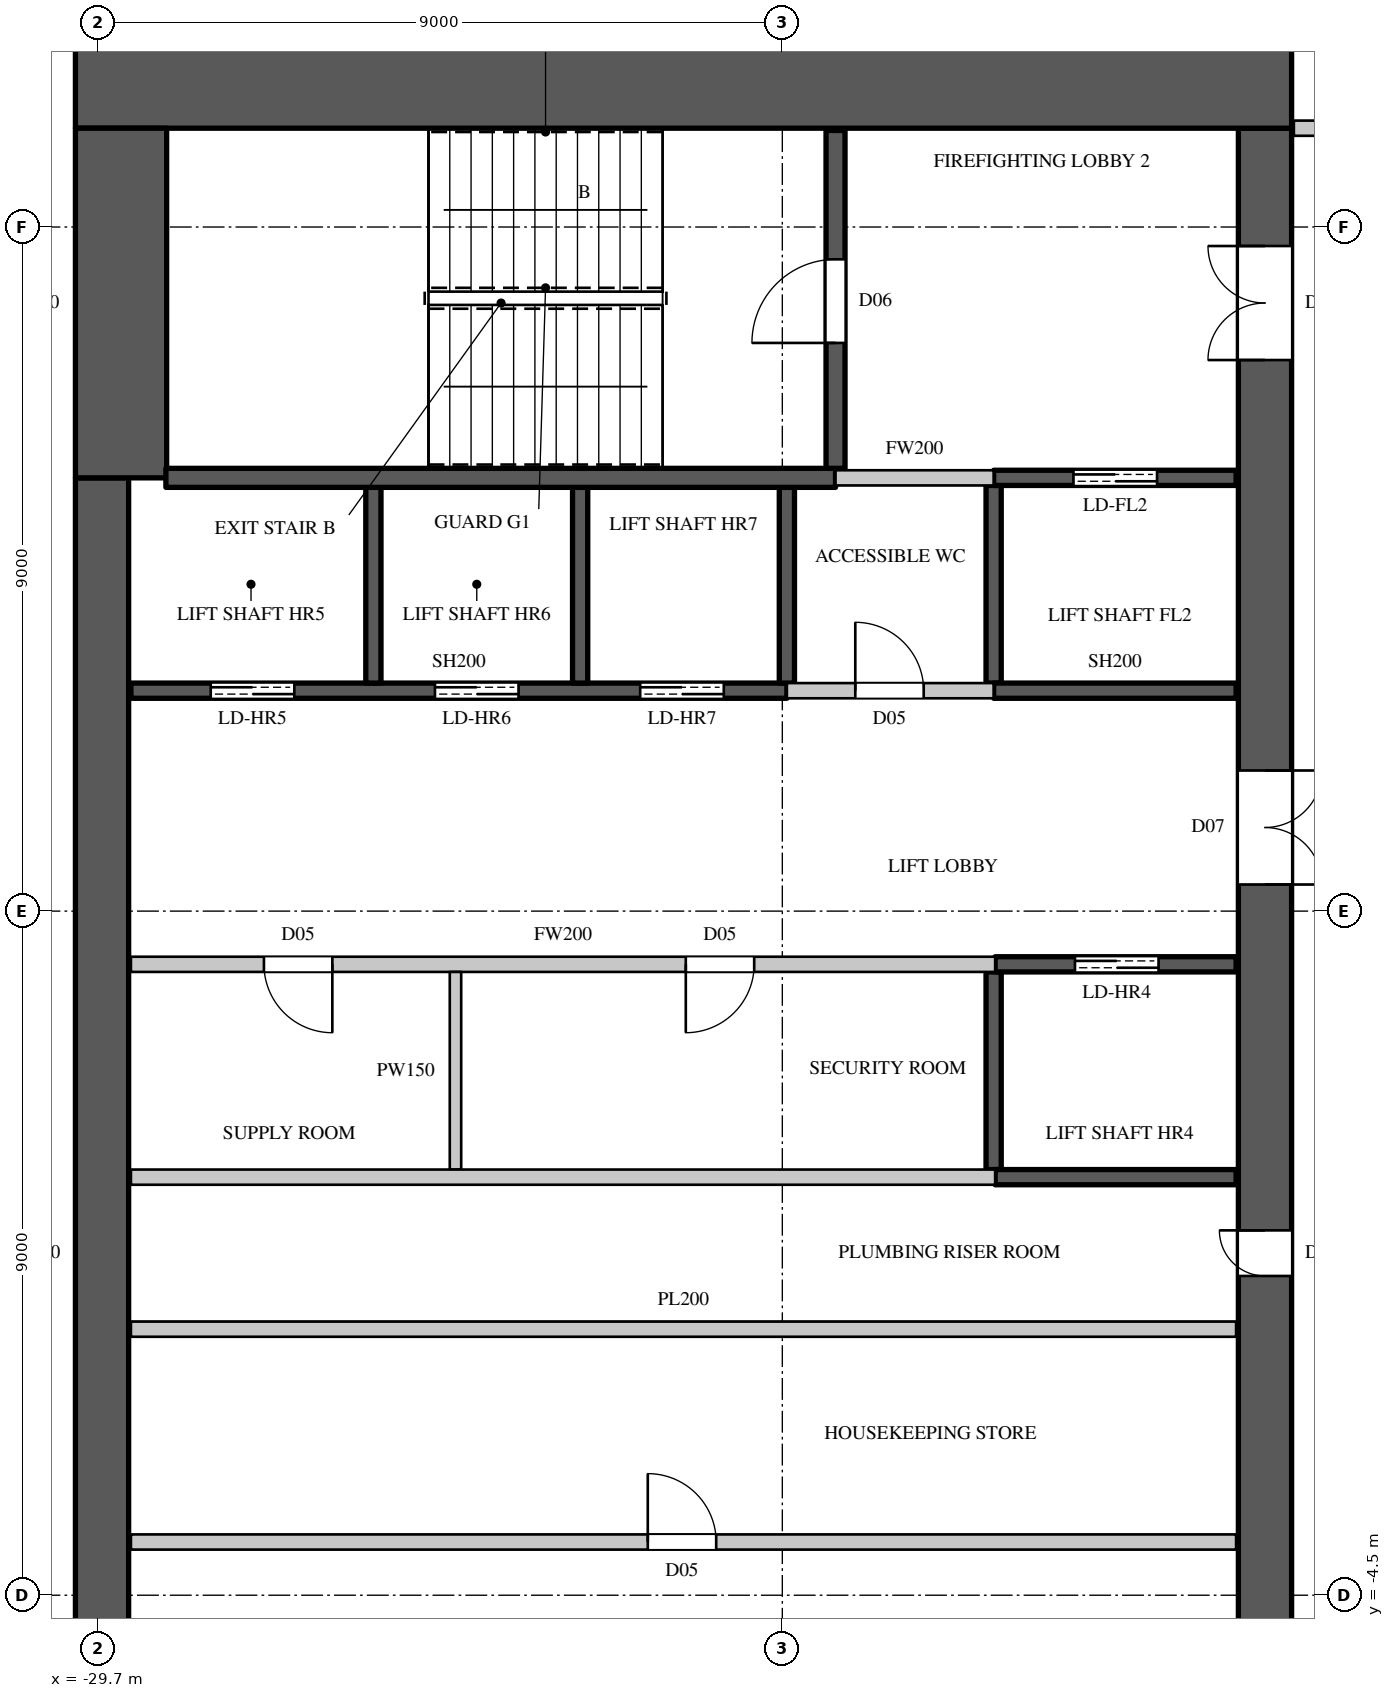
"""IFC4 building model, lengths in metres.
Left out: names, types, materials, properties, quantities, classifications, styles, units other than length and angle.
Written with IfcOpenShell. Run it as: python <this file> out.ifc"""

import sys

from ifc_helpers import new_model, si_unit, direction, frame, frame_2d, origin, place, context, subcontext, project, spatial, rectangle, extrude, element, fill, save


model = new_model("IFC4")
c1 = context("Model", 3, precision=1e-05, world=origin(), true_north=direction((0.0, 1.0)))
c2 = subcontext(c1, "Body", "Model", "MODEL_VIEW")
j1 = project(units=[si_unit("LENGTHUNIT", "METRE"), si_unit("PLANEANGLEUNIT", "RADIAN")], contexts=[c1])
p1 = place(None, origin())
s1 = spatial("IfcSite", under=j1, at=p1, CompositionType="ELEMENT")
p2 = place(p1, origin())
s2 = spatial("IfcBuilding", under=s1, at=p2, CompositionType="ELEMENT")
p3 = place(p2, frame((0.0, 0.0, 255.7)))
s3 = spatial("IfcBuildingStorey", under=s2, at=p3, CompositionType="ELEMENT", Elevation=255.7)
p4 = place(p3, frame((-30.0, 15.4, 0.0), z_axis=(0.0, 0.0, 1.0), x_axis=(1.0, 0.0, 0.0)))
e1 = element("IfcWall", 1, at=p4, inside=s3, PredefinedType="SHEAR", context=c2, shape_type="SweptSolid", body=[
    extrude(rectangle(XDim=16.0, YDim=1.2, at=frame_2d((8.0, 0.0))), origin(), (0.0, 0.0, 1.0), 4.1),
])
p5 = place(p3, frame((-14.35, -14.8, 0.0), z_axis=(0.0, 0.0, 1.0), x_axis=(0.0, 1.0, 0.0)))
e2 = element("IfcWall", 2, at=p5, inside=s3, PredefinedType="SHEAR", context=c2, shape_type="SweptSolid", body=[
    extrude(rectangle(XDim=29.6, YDim=0.7, at=frame_2d((14.8, 0.0))), origin(), (0.0, 0.0, 1.0), 4.1),
])
p6 = place(p5, frame((1.55, 0.0, 0.0)))
e3 = element("IfcOpeningElement", 3, at=p6, cuts=e2, PredefinedType="OPENING", context=c2, shape_type="SweptSolid", body=[
    extrude(rectangle(XDim=1.5, YDim=2.4, at=frame_2d((0.75, 1.2))), frame((0.0, 0.36, 0.0), z_axis=(0.0, -1.0, 0.0), x_axis=(1.0, 0.0, 0.0)), (0.0, 0.0, 1.0), 0.72),
])
p7 = place(p5, frame((26.55, 0.0, 0.0)))
e4 = element("IfcOpeningElement", 4, at=p7, cuts=e2, PredefinedType="OPENING", context=c2, shape_type="SweptSolid", body=[
    extrude(rectangle(XDim=1.5, YDim=2.4, at=frame_2d((0.75, 1.2))), frame((0.0, 0.36, 0.0), z_axis=(0.0, -1.0, 0.0), x_axis=(1.0, 0.0, 0.0)), (0.0, 0.0, 1.0), 0.72),
])
p8 = place(p5, frame((8.45, 0.0, 0.0)))
e5 = element("IfcOpeningElement", 5, at=p8, cuts=e2, PredefinedType="OPENING", context=c2, shape_type="SweptSolid", body=[
    extrude(rectangle(XDim=1.5, YDim=2.4, at=frame_2d((0.75, 1.2))), frame((0.0, 0.36, 0.0), z_axis=(0.0, -1.0, 0.0), x_axis=(1.0, 0.0, 0.0)), (0.0, 0.0, 1.0), 0.72),
])
p9 = place(p5, frame((19.65, 0.0, 0.0)))
e6 = element("IfcOpeningElement", 6, at=p9, cuts=e2, PredefinedType="OPENING", context=c2, shape_type="SweptSolid", body=[
    extrude(rectangle(XDim=1.5, YDim=2.4, at=frame_2d((0.75, 1.2))), frame((0.0, 0.36, 0.0), z_axis=(0.0, -1.0, 0.0), x_axis=(1.0, 0.0, 0.0)), (0.0, 0.0, 1.0), 0.72),
])
p10 = place(p5, frame((14.5, 0.0, 0.0)))
e7 = element("IfcOpeningElement", 7, at=p10, cuts=e2, PredefinedType="OPENING", context=c2, shape_type="SweptSolid", body=[
    extrude(rectangle(XDim=0.6, YDim=2.0, at=frame_2d((0.3, 1.0))), frame((0.0, 0.36, 0.0), z_axis=(0.0, -1.0, 0.0), x_axis=(1.0, 0.0, 0.0)), (0.0, 0.0, 1.0), 0.72),
])
p11 = place(p3, frame((-29.65, -10.2, 0.0), z_axis=(0.0, 0.0, 1.0), x_axis=(0.0, 1.0, 0.0)))
e8 = element("IfcWall", 8, at=p11, inside=s3, PredefinedType="SHEAR", context=c2, shape_type="SweptSolid", body=[
    extrude(rectangle(XDim=20.4, YDim=0.7, at=frame_2d((10.2, 0.0))), origin(), (0.0, 0.0, 1.0), 4.1),
])
p12 = place(p3, frame((-29.4, 10.2, 0.0), z_axis=(0.0, 0.0, 1.0), x_axis=(0.0, 1.0, 0.0)))
e9 = element("IfcWall", 9, at=p12, inside=s3, PredefinedType="SHEAR", context=c2, shape_type="SweptSolid", body=[
    extrude(rectangle(XDim=4.6, YDim=1.2, at=frame_2d((2.3, 0.0))), origin(), (0.0, 0.0, 1.0), 4.1),
])
p13 = place(p3, frame((-29.27, -3.8, 0.0), z_axis=(0.0, 0.0, 1.0), x_axis=(1.0, 0.0, 0.0)))
e10 = element("IfcWall", 10, at=p13, inside=s3, PredefinedType="PARTITIONING", context=c2, shape_type="SweptSolid", body=[
    extrude(rectangle(XDim=14.54, YDim=0.2, at=frame_2d((7.27, 0.0))), origin(), (0.0, 0.0, 1.0), 3.8),
])
p14 = place(p13, frame((6.8, 0.0, 0.0)))
e11 = element("IfcOpeningElement", 11, at=p14, cuts=e10, PredefinedType="OPENING", context=c2, shape_type="SweptSolid", body=[
    extrude(rectangle(XDim=0.9, YDim=2.2, at=frame_2d((0.45, 1.1))), frame((0.0, 0.11, 0.0), z_axis=(0.0, -1.0, 0.0), x_axis=(1.0, 0.0, 0.0)), (0.0, 0.0, 1.0), 0.22),
])
p15 = place(p3, frame((-29.27, 3.8, 0.0), z_axis=(0.0, 0.0, 1.0), x_axis=(1.0, 0.0, 0.0)))
e12 = element("IfcWall", 12, at=p15, inside=s3, PredefinedType="PARTITIONING", context=c2, shape_type="SweptSolid", body=[
    extrude(rectangle(XDim=11.37, YDim=0.2, at=frame_2d((5.685, 0.0))), origin(), (0.0, 0.0, 1.0), 3.8),
])
p16 = place(p15, frame((1.75, 0.0, 0.0)))
e13 = element("IfcOpeningElement", 13, at=p16, cuts=e12, PredefinedType="OPENING", context=c2, shape_type="SweptSolid", body=[
    extrude(rectangle(XDim=0.9, YDim=2.2, at=frame_2d((0.45, 1.1))), frame((0.0, 0.11, 0.0), z_axis=(0.0, -1.0, 0.0), x_axis=(1.0, 0.0, 0.0)), (0.0, 0.0, 1.0), 0.22),
])
p17 = place(p15, frame((7.3, 0.0, 0.0)))
e14 = element("IfcOpeningElement", 14, at=p17, cuts=e12, PredefinedType="OPENING", context=c2, shape_type="SweptSolid", body=[
    extrude(rectangle(XDim=0.9, YDim=2.2, at=frame_2d((0.45, 1.1))), frame((0.0, 0.11, 0.0), z_axis=(0.0, -1.0, 0.0), x_axis=(1.0, 0.0, 0.0)), (0.0, 0.0, 1.0), 0.22),
])
p18 = place(p3, frame((-20.64, 7.4, 0.0), z_axis=(0.0, 0.0, 1.0), x_axis=(1.0, 0.0, 0.0)))
e15 = element("IfcWall", 15, at=p18, inside=s3, PredefinedType="PARTITIONING", context=c2, shape_type="SweptSolid", body=[
    extrude(rectangle(XDim=2.72, YDim=0.2, at=frame_2d((1.36, 0.0))), origin(), (0.0, 0.0, 1.0), 3.8),
])
p19 = place(p18, frame((0.9, 0.0, 0.0)))
e16 = element("IfcOpeningElement", 16, at=p19, cuts=e15, PredefinedType="OPENING", context=c2, shape_type="SweptSolid", body=[
    extrude(rectangle(XDim=0.9, YDim=2.2, at=frame_2d((0.45, 1.1))), frame((0.0, 0.11, 0.0), z_axis=(0.0, -1.0, 0.0), x_axis=(1.0, 0.0, 0.0)), (0.0, 0.0, 1.0), 0.22),
])
p20 = place(p3, frame((-20.0, 10.2, 0.0), z_axis=(0.0, 0.0, 1.0), x_axis=(1.0, 0.0, 0.0)))
e17 = element("IfcWall", 17, at=p20, inside=s3, PredefinedType="PARTITIONING", context=c2, shape_type="SweptSolid", body=[
    extrude(rectangle(XDim=2.08, YDim=0.2, at=frame_2d((1.04, 0.0))), origin(), (0.0, 0.0, 1.0), 3.8),
])
p21 = place(p3, frame((-13.97, 14.8, 0.0), z_axis=(0.0, 0.0, 1.0), x_axis=(1.0, 0.0, 0.0)))
e18 = element("IfcWall", 18, at=p21, inside=s3, PredefinedType="PARTITIONING", context=c2, shape_type="SweptSolid", body=[
    extrude(rectangle(XDim=3.07, YDim=0.2, at=frame_2d((1.535, 0.0))), origin(), (0.0, 0.0, 1.0), 3.8),
])
p22 = place(p3, frame((-25.0, 1.1, 0.0), z_axis=(0.0, 0.0, 1.0), x_axis=(0.0, 1.0, 0.0)))
e19 = element("IfcWall", 19, at=p22, inside=s3, PredefinedType="PARTITIONING", context=c2, shape_type="SweptSolid", body=[
    extrude(rectangle(XDim=2.6, YDim=0.15, at=frame_2d((1.3, 0.0))), origin(), (0.0, 0.0, 1.0), 3.8),
])
p23 = place(p3, frame((-29.27, -1.0, 0.0), z_axis=(0.0, 0.0, 1.0), x_axis=(1.0, 0.0, 0.0)))
e20 = element("IfcWall", 20, at=p23, inside=s3, PredefinedType="PARTITIONING", context=c2, shape_type="SweptSolid", body=[
    extrude(rectangle(XDim=14.54, YDim=0.2, at=frame_2d((7.27, 0.0))), origin(), (0.0, 0.0, 1.0), 3.8),
])
p24 = place(p3, frame((-29.27, 1.0, 0.0), z_axis=(0.0, 0.0, 1.0), x_axis=(1.0, 0.0, 0.0)))
e21 = element("IfcWall", 21, at=p24, inside=s3, PredefinedType="PARTITIONING", context=c2, shape_type="SweptSolid", body=[
    extrude(rectangle(XDim=11.37, YDim=0.2, at=frame_2d((5.685, 0.0))), origin(), (0.0, 0.0, 1.0), 3.8),
])
p25 = place(p3, frame((-29.27, 7.4, 0.0), z_axis=(0.0, 0.0, 1.0), x_axis=(1.0, 0.0, 0.0)))
e22 = element("IfcWall", 22, at=p25, inside=s3, PredefinedType="SHEAR", context=c2, shape_type="SweptSolid", body=[
    extrude(rectangle(XDim=8.63, YDim=0.2, at=frame_2d((4.315, 0.0))), origin(), (0.0, 0.0, 1.0), 3.8),
])
p26 = place(p25, frame((1.05, 0.0, 0.0)))
e23 = element("IfcOpeningElement", 23, at=p26, cuts=e22, PredefinedType="OPENING", context=c2, shape_type="SweptSolid", body=[
    extrude(rectangle(XDim=1.1, YDim=2.2, at=frame_2d((0.55, 1.1))), frame((0.0, 0.11, 0.0), z_axis=(0.0, -1.0, 0.0), x_axis=(1.0, 0.0, 0.0)), (0.0, 0.0, 1.0), 0.22),
])
p27 = place(p25, frame((4.0, 0.0, 0.0)))
e24 = element("IfcOpeningElement", 24, at=p27, cuts=e22, PredefinedType="OPENING", context=c2, shape_type="SweptSolid", body=[
    extrude(rectangle(XDim=1.1, YDim=2.2, at=frame_2d((0.55, 1.1))), frame((0.0, 0.11, 0.0), z_axis=(0.0, -1.0, 0.0), x_axis=(1.0, 0.0, 0.0)), (0.0, 0.0, 1.0), 0.22),
])
p28 = place(p25, frame((6.7, 0.0, 0.0)))
e25 = element("IfcOpeningElement", 25, at=p28, cuts=e22, PredefinedType="OPENING", context=c2, shape_type="SweptSolid", body=[
    extrude(rectangle(XDim=1.1, YDim=2.2, at=frame_2d((0.55, 1.1))), frame((0.0, 0.11, 0.0), z_axis=(0.0, -1.0, 0.0), x_axis=(1.0, 0.0, 0.0)), (0.0, 0.0, 1.0), 0.22),
])
for number, where, z_axis, x_axis in (
    (26, (-26.08, 7.5, 0.0), (0.0, 0.0, 1.0), (0.0, 1.0, 0.0)),
    (27, (-23.36, 7.5, 0.0), (0.0, 0.0, 1.0), (0.0, 1.0, 0.0)),
):
    element("IfcWall", number, at=place(p3, frame(where, z_axis=z_axis, x_axis=x_axis)), inside=s3, PredefinedType="SHEAR", context=c2, shape_type="SweptSolid", body=[
        extrude(rectangle(XDim=2.575, YDim=0.2, at=frame_2d((1.288, 0.0))), origin(), (0.0, 0.0, 1.0), 4.1),
    ])
p29 = place(p3, frame((-20.64, 7.5, 0.0), z_axis=(0.0, 0.0, 1.0), x_axis=(0.0, 1.0, 0.0)))
e28 = element("IfcWall", 28, at=p29, inside=s3, PredefinedType="SHEAR", context=c2, shape_type="SweptSolid", body=[
    extrude(rectangle(XDim=2.575, YDim=0.2, at=frame_2d((1.288, 0.0))), origin(), (0.0, 0.0, 1.0), 3.8),
])
p30 = place(p3, frame((-17.92, 1.1, 0.0), z_axis=(0.0, 0.0, 1.0), x_axis=(0.0, 1.0, 0.0)))
e29 = element("IfcWall", 29, at=p30, inside=s3, PredefinedType="SHEAR", context=c2, shape_type="SweptSolid", body=[
    extrude(rectangle(XDim=2.6, YDim=0.2, at=frame_2d((1.3, 0.0))), origin(), (0.0, 0.0, 1.0), 3.8),
])
p31 = place(p3, frame((-17.9, 1.0, 0.0), z_axis=(0.0, 0.0, 1.0), x_axis=(1.0, 0.0, 0.0)))
e30 = element("IfcWall", 30, at=p31, inside=s3, PredefinedType="SHEAR", context=c2, shape_type="SweptSolid", body=[
    extrude(rectangle(XDim=3.17, YDim=0.2, at=frame_2d((1.585, 0.0))), origin(), (0.0, 0.0, 1.0), 3.8),
])
p32 = place(p3, frame((-17.9, 3.8, 0.0), z_axis=(0.0, 0.0, 1.0), x_axis=(1.0, 0.0, 0.0)))
e31 = element("IfcWall", 31, at=p32, inside=s3, PredefinedType="SHEAR", context=c2, shape_type="SweptSolid", body=[
    extrude(rectangle(XDim=3.17, YDim=0.2, at=frame_2d((1.585, 0.0))), origin(), (0.0, 0.0, 1.0), 3.8),
])
p33 = place(p32, frame((1.05, 0.0, 0.0)))
e32 = element("IfcOpeningElement", 32, at=p33, cuts=e31, PredefinedType="OPENING", context=c2, shape_type="SweptSolid", body=[
    extrude(rectangle(XDim=1.1, YDim=2.2, at=frame_2d((0.55, 1.1))), frame((0.0, 0.11, 0.0), z_axis=(0.0, -1.0, 0.0), x_axis=(1.0, 0.0, 0.0)), (0.0, 0.0, 1.0), 0.22),
])
p34 = place(p3, frame((-17.92, 7.5, 0.0), z_axis=(0.0, 0.0, 1.0), x_axis=(0.0, 1.0, 0.0)))
e33 = element("IfcWall", 33, at=p34, inside=s3, PredefinedType="SHEAR", context=c2, shape_type="SweptSolid", body=[
    extrude(rectangle(XDim=2.6, YDim=0.2, at=frame_2d((1.3, 0.0))), origin(), (0.0, 0.0, 1.0), 3.8),
])
p35 = place(p3, frame((-17.92, 7.4, 0.0), z_axis=(0.0, 0.0, 1.0), x_axis=(1.0, 0.0, 0.0)))
e34 = element("IfcWall", 34, at=p35, inside=s3, PredefinedType="SHEAR", context=c2, shape_type="SweptSolid", body=[
    extrude(rectangle(XDim=3.19, YDim=0.2, at=frame_2d((1.595, 0.0))), origin(), (0.0, 0.0, 1.0), 3.8),
])
p36 = place(p3, frame((-17.92, 10.2, 0.0), z_axis=(0.0, 0.0, 1.0), x_axis=(1.0, 0.0, 0.0)))
e35 = element("IfcWall", 35, at=p36, inside=s3, PredefinedType="SHEAR", context=c2, shape_type="SweptSolid", body=[
    extrude(rectangle(XDim=3.19, YDim=0.2, at=frame_2d((1.595, 0.0))), origin(), (0.0, 0.0, 1.0), 3.8),
])
p37 = place(p36, frame((1.05, 0.0, 0.0)))
e36 = element("IfcOpeningElement", 36, at=p37, cuts=e35, PredefinedType="OPENING", context=c2, shape_type="SweptSolid", body=[
    extrude(rectangle(XDim=1.1, YDim=2.2, at=frame_2d((0.55, 1.1))), frame((0.0, 0.11, 0.0), z_axis=(0.0, -1.0, 0.0), x_axis=(1.0, 0.0, 0.0)), (0.0, 0.0, 1.0), 0.22),
])
p38 = place(p3, frame((-28.81, 10.2, 0.0), z_axis=(0.0, 0.0, 1.0), x_axis=(1.0, 0.0, 0.0)))
e37 = element("IfcWall", 37, at=p38, inside=s3, PredefinedType="SHEAR", context=c2, shape_type="SweptSolid", body=[
    extrude(rectangle(XDim=8.81, YDim=0.25, at=frame_2d((4.405, 0.0))), origin(), (0.0, 0.0, 1.0), 3.8),
])
p39 = place(p3, frame((-20.0, 10.325, 0.0), z_axis=(0.0, 0.0, 1.0), x_axis=(0.0, 1.0, 0.0)))
e38 = element("IfcWall", 38, at=p39, inside=s3, PredefinedType="SHEAR", context=c2, shape_type="SweptSolid", body=[
    extrude(rectangle(XDim=4.445, YDim=0.25, at=frame_2d((2.223, 0.0))), origin(), (0.0, 0.0, 1.0), 3.8),
])
p40 = place(p39, frame((1.65, 0.0, 0.0)))
e39 = element("IfcOpeningElement", 39, at=p40, cuts=e38, PredefinedType="OPENING", context=c2, shape_type="SweptSolid", body=[
    extrude(rectangle(XDim=1.1, YDim=2.2, at=frame_2d((0.55, 1.1))), frame((0.0, 0.135, 0.0), z_axis=(0.0, -1.0, 0.0), x_axis=(1.0, 0.0, 0.0)), (0.0, 0.0, 1.0), 0.27),
])
p41 = place(p40, origin())
e40 = element("IfcDoor", 40, at=p41, inside=s3, OperationType="SINGLE_SWING_LEFT", PredefinedType="DOOR", context=c2, shape_type="SweptSolid", body=[
    extrude(rectangle(XDim=1.1, YDim=2.2, at=frame_2d((0.55, 1.1))), frame((0.0, 0.025, 0.0), z_axis=(0.0, -1.0, 0.0), x_axis=(1.0, 0.0, 0.0)), (0.0, 0.0, 1.0), 0.05),
])
fill(e39, e40)
p42 = place(p14, origin())
e41 = element("IfcDoor", 41, at=p42, inside=s3, OperationType="SINGLE_SWING_LEFT", PredefinedType="DOOR", context=c2, shape_type="SweptSolid", body=[
    extrude(rectangle(XDim=0.9, YDim=2.2, at=frame_2d((0.45, 1.1))), frame((0.0, 0.025, 0.0), z_axis=(0.0, -1.0, 0.0), x_axis=(1.0, 0.0, 0.0)), (0.0, 0.0, 1.0), 0.05),
])
fill(e11, e41)
p43 = place(p16, origin())
e42 = element("IfcDoor", 42, at=p43, inside=s3, OperationType="SINGLE_SWING_LEFT", PredefinedType="DOOR", context=c2, shape_type="SweptSolid", body=[
    extrude(rectangle(XDim=0.9, YDim=2.2, at=frame_2d((0.45, 1.1))), frame((0.0, 0.025, 0.0), z_axis=(0.0, -1.0, 0.0), x_axis=(1.0, 0.0, 0.0)), (0.0, 0.0, 1.0), 0.05),
])
fill(e13, e42)
p44 = place(p17, origin())
e43 = element("IfcDoor", 43, at=p44, inside=s3, OperationType="SINGLE_SWING_RIGHT", PredefinedType="DOOR", context=c2, shape_type="SweptSolid", body=[
    extrude(rectangle(XDim=0.9, YDim=2.2, at=frame_2d((0.45, 1.1))), frame((0.0, 0.025, 0.0), z_axis=(0.0, -1.0, 0.0), x_axis=(1.0, 0.0, 0.0)), (0.0, 0.0, 1.0), 0.05),
])
fill(e14, e43)
p45 = place(p19, origin())
e44 = element("IfcDoor", 44, at=p45, inside=s3, OperationType="SINGLE_SWING_LEFT", PredefinedType="DOOR", context=c2, shape_type="SweptSolid", body=[
    extrude(rectangle(XDim=0.9, YDim=2.2, at=frame_2d((0.45, 1.1))), frame((0.0, 0.025, 0.0), z_axis=(0.0, -1.0, 0.0), x_axis=(1.0, 0.0, 0.0)), (0.0, 0.0, 1.0), 0.05),
])
fill(e16, e44)
p46 = place(p33, origin())
e45 = element("IfcDoor", 45, at=p46, inside=s3, OperationType="DOUBLE_DOOR_SLIDING", PredefinedType="DOOR", context=c2, shape_type="SweptSolid", body=[
    extrude(rectangle(XDim=1.1, YDim=2.2, at=frame_2d((0.55, 1.1))), frame((0.0, 0.025, 0.0), z_axis=(0.0, -1.0, 0.0), x_axis=(1.0, 0.0, 0.0)), (0.0, 0.0, 1.0), 0.05),
])
fill(e32, e45)
p47 = place(p26, origin())
e46 = element("IfcDoor", 46, at=p47, inside=s3, OperationType="DOUBLE_DOOR_SLIDING", PredefinedType="DOOR", context=c2, shape_type="SweptSolid", body=[
    extrude(rectangle(XDim=1.1, YDim=2.2, at=frame_2d((0.55, 1.1))), frame((0.0, 0.025, 0.0), z_axis=(0.0, -1.0, 0.0), x_axis=(1.0, 0.0, 0.0)), (0.0, 0.0, 1.0), 0.05),
])
fill(e23, e46)
p48 = place(p27, origin())
e47 = element("IfcDoor", 47, at=p48, inside=s3, OperationType="DOUBLE_DOOR_SLIDING", PredefinedType="DOOR", context=c2, shape_type="SweptSolid", body=[
    extrude(rectangle(XDim=1.1, YDim=2.2, at=frame_2d((0.55, 1.1))), frame((0.0, 0.025, 0.0), z_axis=(0.0, -1.0, 0.0), x_axis=(1.0, 0.0, 0.0)), (0.0, 0.0, 1.0), 0.05),
])
fill(e24, e47)
p49 = place(p28, origin())
e48 = element("IfcDoor", 48, at=p49, inside=s3, OperationType="DOUBLE_DOOR_SLIDING", PredefinedType="DOOR", context=c2, shape_type="SweptSolid", body=[
    extrude(rectangle(XDim=1.1, YDim=2.2, at=frame_2d((0.55, 1.1))), frame((0.0, 0.025, 0.0), z_axis=(0.0, -1.0, 0.0), x_axis=(1.0, 0.0, 0.0)), (0.0, 0.0, 1.0), 0.05),
])
fill(e25, e48)
p50 = place(p37, origin())
e49 = element("IfcDoor", 49, at=p50, inside=s3, OperationType="DOUBLE_DOOR_SLIDING", PredefinedType="DOOR", context=c2, shape_type="SweptSolid", body=[
    extrude(rectangle(XDim=1.1, YDim=2.2, at=frame_2d((0.55, 1.1))), frame((0.0, 0.025, 0.0), z_axis=(0.0, -1.0, 0.0), x_axis=(1.0, 0.0, 0.0)), (0.0, 0.0, 1.0), 0.05),
])
fill(e36, e49)
p51 = place(p7, origin())
e50 = element("IfcDoor", 50, at=p51, inside=s3, OperationType="DOUBLE_DOOR_SINGLE_SWING", PredefinedType="DOOR", context=c2, shape_type="SweptSolid", body=[
    extrude(rectangle(XDim=1.5, YDim=2.4, at=frame_2d((0.75, 1.2))), frame((0.0, 0.345, 0.0), z_axis=(0.0, -1.0, 0.0), x_axis=(1.0, 0.0, 0.0)), (0.0, 0.0, 1.0), 0.05),
])
fill(e4, e50)
p52 = place(p9, origin())
e51 = element("IfcDoor", 51, at=p52, inside=s3, OperationType="DOUBLE_DOOR_SINGLE_SWING", PredefinedType="DOOR", context=c2, shape_type="SweptSolid", body=[
    extrude(rectangle(XDim=1.5, YDim=2.4, at=frame_2d((0.75, 1.2))), frame((0.0, -0.295, 0.0), z_axis=(0.0, -1.0, 0.0), x_axis=(1.0, 0.0, 0.0)), (0.0, 0.0, 1.0), 0.05),
])
fill(e6, e51)
p53 = place(p10, origin())
e52 = element("IfcDoor", 52, at=p53, inside=s3, OperationType="SINGLE_SWING_RIGHT", PredefinedType="DOOR", context=c2, shape_type="SweptSolid", body=[
    extrude(rectangle(XDim=0.6, YDim=2.0, at=frame_2d((0.3, 1.0))), frame((0.0, 0.345, 0.0), z_axis=(0.0, -1.0, 0.0), x_axis=(1.0, 0.0, 0.0)), (0.0, 0.0, 1.0), 0.05),
])
fill(e7, e52)
save(model, sys.argv[1])
